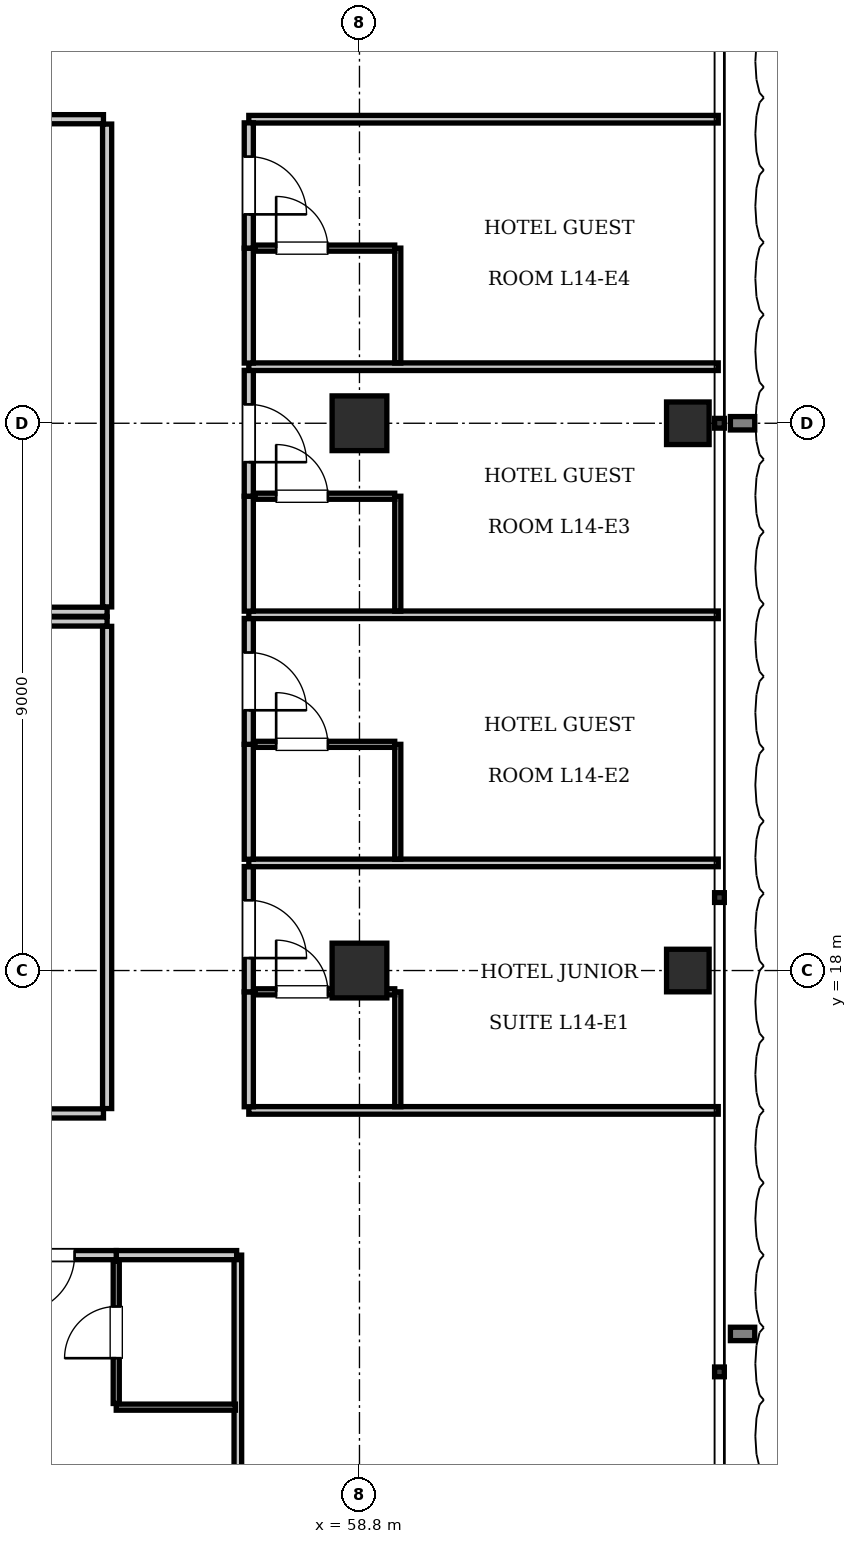
"""IFC4 building model, lengths in metres.
Left out: names, types, materials, properties, quantities, classifications, styles, units other than length and angle.
Written with IfcOpenShell. Run it as: python <this file> out.ifc"""

import sys

from ifc_helpers import new_model, si_unit, direction, frame, frame_2d, origin, origin_2d, place, context, subcontext, project, spatial, rectangle, i_section, extrude, element, fill, save


model = new_model("IFC4")
c1 = context("Model", 3, precision=1e-05, world=origin(), true_north=direction((0.0, 1.0)))
c2 = subcontext(c1, "Body", "Model", "MODEL_VIEW")
j1 = project(units=[si_unit("LENGTHUNIT", "METRE"), si_unit("PLANEANGLEUNIT", "RADIAN")], contexts=[c1])
p1 = place(None, origin())
s1 = spatial("IfcSite", under=j1, at=p1, CompositionType="ELEMENT")
p2 = place(p1, origin())
s2 = spatial("IfcBuilding", under=s1, at=p2, CompositionType="ELEMENT")
p3 = place(p2, frame((0.0, 0.0, 61.6)))
s3 = spatial("IfcBuildingStorey", under=s2, at=p3, CompositionType="ELEMENT", Elevation=61.6)
for number, where, z_axis, x_axis in (
    (1, (58.8, 18.0, 0.0), (0.0, 0.0, 1.0), (1.0, 0.0, 0.0)),
    (2, (58.8, 27.0, 0.0), (0.0, 0.0, 1.0), (1.0, 0.0, 0.0)),
):
    element("IfcColumn", number, at=place(p3, frame(where, z_axis=z_axis, x_axis=x_axis)), inside=s3, PredefinedType="COLUMN", context=c2, shape_type="SweptSolid", body=[
        extrude(rectangle(XDim=0.9, YDim=0.9, at=origin_2d()), origin(), (0.0, 0.0, 1.0), 3.85),
    ])
for number, where, z_axis, x_axis in (
    (3, (64.2, 18.0, 0.0), (0.0, 0.0, 1.0), (1.0, 0.0, 0.0)),
    (4, (64.2, 27.0, 0.0), (0.0, 0.0, 1.0), (1.0, 0.0, 0.0)),
):
    element("IfcColumn", number, at=place(p3, frame(where, z_axis=z_axis, x_axis=x_axis)), inside=s3, PredefinedType="COLUMN", context=c2, shape_type="SweptSolid", body=[
        extrude(i_section(OverallWidth=0.7, OverallDepth=0.7, WebThickness=0.028, FlangeThickness=0.044, at=origin_2d()), origin(), (0.0, 0.0, 1.0), 3.85),
    ])
p4 = place(p3, frame((20.95, 23.9, 0.0), z_axis=(0.0, 0.0, 1.0), x_axis=(1.0, 0.0, 0.0)))
e5 = element("IfcWall", 5, at=p4, inside=s3, PredefinedType="PARTITIONING", context=c2, shape_type="SweptSolid", body=[
    extrude(rectangle(XDim=33.7, YDim=0.15, at=frame_2d((16.85, 0.0))), origin(), (0.0, 0.0, 1.0), 3.61),
])
p5 = place(p3, frame((54.65, 23.98, 0.0), z_axis=(0.0, 0.0, 1.0), x_axis=(0.0, 1.0, 0.0)))
e6 = element("IfcWall", 6, at=p5, inside=s3, PredefinedType="PARTITIONING", context=c2, shape_type="SweptSolid", body=[
    extrude(rectangle(XDim=7.94, YDim=0.15, at=frame_2d((3.97, 0.0))), origin(), (0.0, 0.0, 1.0), 3.293),
])
p6 = place(p3, frame((43.222, 32.0, 0.0), z_axis=(0.0, 0.0, 1.0), x_axis=(1.0, 0.0, 0.0)))
e7 = element("IfcWall", 7, at=p6, inside=s3, PredefinedType="PARTITIONING", context=c2, shape_type="SweptSolid", body=[
    extrude(rectangle(XDim=11.368, YDim=0.15, at=frame_2d((5.684, 0.0))), origin(), (0.0, 0.0, 1.0), 3.61),
])
p7 = place(p6, frame((5.234, 0.0, 0.0)))
e8 = element("IfcOpeningElement", 8, at=p7, cuts=e7, PredefinedType="OPENING", context=c2, shape_type="SweptSolid", body=[
    extrude(rectangle(XDim=0.9, YDim=2.1, at=frame_2d((0.45, 1.05))), frame((0.0, 0.085, 0.0), z_axis=(0.0, -1.0, 0.0), x_axis=(1.0, 0.0, 0.0)), (0.0, 0.0, 1.0), 0.17),
])
p8 = place(p3, frame((20.95, 23.74, 0.0), z_axis=(0.0, 0.0, 1.0), x_axis=(1.0, 0.0, 0.0)))
e9 = element("IfcWall", 9, at=p8, inside=s3, PredefinedType="PARTITIONING", context=c2, shape_type="SweptSolid", body=[
    extrude(rectangle(XDim=33.7, YDim=0.15, at=frame_2d((16.85, 0.0))), origin(), (0.0, 0.0, 1.0), 3.61),
])
p9 = place(p3, frame((54.65, 15.73, 0.0), z_axis=(0.0, 0.0, 1.0), x_axis=(0.0, 1.0, 0.0)))
e10 = element("IfcWall", 10, at=p9, inside=s3, PredefinedType="PARTITIONING", context=c2, shape_type="SweptSolid", body=[
    extrude(rectangle(XDim=7.93, YDim=0.15, at=frame_2d((3.965, 0.0))), origin(), (0.0, 0.0, 1.0), 3.255),
])
p10 = place(p3, frame((40.189, 15.65, 0.0), z_axis=(0.0, 0.0, 1.0), x_axis=(1.0, 0.0, 0.0)))
e11 = element("IfcWall", 11, at=p10, inside=s3, PredefinedType="PARTITIONING", context=c2, shape_type="SweptSolid", body=[
    extrude(rectangle(XDim=14.401, YDim=0.15, at=frame_2d((7.201, 0.0))), origin(), (0.0, 0.0, 1.0), 3.61),
])
p11 = place(p10, frame((6.75, 0.0, 0.0)))
e12 = element("IfcOpeningElement", 12, at=p11, cuts=e11, PredefinedType="OPENING", context=c2, shape_type="SweptSolid", body=[
    extrude(rectangle(XDim=0.9, YDim=2.1, at=frame_2d((0.45, 1.05))), frame((0.0, 0.085, 0.0), z_axis=(0.0, -1.0, 0.0), x_axis=(1.0, 0.0, 0.0)), (0.0, 0.0, 1.0), 0.17),
])
p12 = place(p3, frame((56.8, 0.1, 0.0), z_axis=(0.0, 0.0, 1.0), x_axis=(0.0, 1.0, 0.0)))
e13 = element("IfcWall", 13, at=p12, inside=s3, PredefinedType="PARTITIONING", context=c2, shape_type="SweptSolid", body=[
    extrude(rectangle(XDim=13.22, YDim=0.125, at=frame_2d((6.61, 0.0))), origin(), (0.0, 0.0, 1.0), 3.61),
])
p13 = place(p3, frame((54.8, 13.32, 0.0), z_axis=(0.0, 0.0, 1.0), x_axis=(1.0, 0.0, 0.0)))
e14 = element("IfcWall", 14, at=p13, inside=s3, PredefinedType="PARTITIONING", context=c2, shape_type="SweptSolid", body=[
    extrude(rectangle(XDim=1.98, YDim=0.15, at=frame_2d((0.99, 0.0))), origin(), (0.0, 0.0, 1.0), 3.61),
])
p14 = place(p3, frame((54.8, 10.82, 0.0), z_axis=(0.0, 0.0, 1.0), x_axis=(1.0, 0.0, 0.0)))
e15 = element("IfcWall", 15, at=p14, inside=s3, PredefinedType="PARTITIONING", context=c2, shape_type="SweptSolid", body=[
    extrude(rectangle(XDim=1.96, YDim=0.1, at=frame_2d((0.98, 0.0))), origin(), (0.0, 0.0, 1.0), 3.61),
])
p15 = place(p3, frame((54.8, 10.88, 0.0), z_axis=(0.0, 0.0, 1.0), x_axis=(0.0, 1.0, 0.0)))
e16 = element("IfcWall", 16, at=p15, inside=s3, PredefinedType="PARTITIONING", context=c2, shape_type="SweptSolid", body=[
    extrude(rectangle(XDim=2.34, YDim=0.1, at=frame_2d((1.17, 0.0))), origin(), (0.0, 0.0, 1.0), 3.61),
])
p16 = place(p15, frame((0.745, 0.0, 0.0)))
e17 = element("IfcOpeningElement", 17, at=p16, cuts=e16, PredefinedType="OPENING", context=c2, shape_type="SweptSolid", body=[
    extrude(rectangle(XDim=0.85, YDim=2.1, at=frame_2d((0.425, 1.05))), frame((0.0, 0.06, 0.0), z_axis=(0.0, -1.0, 0.0), x_axis=(1.0, 0.0, 0.0)), (0.0, 0.0, 1.0), 0.12),
])
p17 = place(p3, frame((52.48, 13.32, 0.0), z_axis=(0.0, 0.0, 1.0), x_axis=(1.0, 0.0, 0.0)))
e18 = element("IfcWall", 18, at=p17, inside=s3, PredefinedType="PARTITIONING", context=c2, shape_type="SweptSolid", body=[
    extrude(rectangle(XDim=2.32, YDim=0.15, at=frame_2d((1.16, 0.0))), origin(), (0.0, 0.0, 1.0), 3.61),
])
p18 = place(p17, frame((0.685, 0.0, 0.0)))
e19 = element("IfcOpeningElement", 19, at=p18, cuts=e18, PredefinedType="OPENING", context=c2, shape_type="SweptSolid", body=[
    extrude(rectangle(XDim=0.95, YDim=2.15, at=frame_2d((0.475, 1.075))), frame((0.0, 0.085, 0.0), z_axis=(0.0, -1.0, 0.0), x_axis=(1.0, 0.0, 0.0)), (0.0, 0.0, 1.0), 0.17),
])
for number, where, z_axis, x_axis in (
    (20, (56.98, 15.7, 0.0), (0.0, 0.0, 1.0), (1.0, 0.0, 0.0)),
    (21, (56.98, 32.0, 0.0), (0.0, 0.0, 1.0), (1.0, 0.0, 0.0)),
):
    element("IfcWall", number, at=place(p3, frame(where, z_axis=z_axis, x_axis=x_axis)), inside=s3, PredefinedType="PARTITIONING", context=c2, shape_type="SweptSolid", body=[
        extrude(rectangle(XDim=7.72, YDim=0.125, at=frame_2d((3.86, 0.0))), origin(), (0.0, 0.0, 1.0), 3.61),
    ])
p19 = place(p3, frame((56.98, 15.76, 0.0), z_axis=(0.0, 0.0, 1.0), x_axis=(0.0, 1.0, 0.0)))
e22 = element("IfcWall", 22, at=p19, inside=s3, PredefinedType="PARTITIONING", context=c2, shape_type="SweptSolid", body=[
    extrude(rectangle(XDim=1.89, YDim=0.15, at=frame_2d((0.945, 0.0))), origin(), (0.0, 0.0, 1.0), 3.61),
])
p20 = place(p3, frame((56.98, 17.65, 0.0), z_axis=(0.0, 0.0, 1.0), x_axis=(0.0, 1.0, 0.0)))
e23 = element("IfcWall", 23, at=p20, inside=s3, PredefinedType="PARTITIONING", context=c2, shape_type="SweptSolid", body=[
    extrude(rectangle(XDim=2.06, YDim=0.15, at=frame_2d((1.03, 0.0))), origin(), (0.0, 0.0, 1.0), 3.61),
])
p21 = place(p20, frame((0.555, 0.0, 0.0)))
e24 = element("IfcOpeningElement", 24, at=p21, cuts=e23, PredefinedType="OPENING", context=c2, shape_type="SweptSolid", body=[
    extrude(rectangle(XDim=0.95, YDim=2.15, at=frame_2d((0.475, 1.075))), frame((0.0, 0.085, 0.0), z_axis=(0.0, -1.0, 0.0), x_axis=(1.0, 0.0, 0.0)), (0.0, 0.0, 1.0), 0.17),
])
p22 = place(p3, frame((59.43, 15.76, 0.0), z_axis=(0.0, 0.0, 1.0), x_axis=(0.0, 1.0, 0.0)))
e25 = element("IfcWall", 25, at=p22, inside=s3, PredefinedType="PARTITIONING", context=c2, shape_type="SweptSolid", body=[
    extrude(rectangle(XDim=1.89, YDim=0.1, at=frame_2d((0.945, 0.0))), origin(), (0.0, 0.0, 1.0), 3.61),
])
p23 = place(p3, frame((57.08, 17.65, 0.0), z_axis=(0.0, 0.0, 1.0), x_axis=(1.0, 0.0, 0.0)))
e26 = element("IfcWall", 26, at=p23, inside=s3, PredefinedType="PARTITIONING", context=c2, shape_type="SweptSolid", body=[
    extrude(rectangle(XDim=2.3, YDim=0.1, at=frame_2d((1.15, 0.0))), origin(), (0.0, 0.0, 1.0), 3.61),
])
p24 = place(p23, frame((0.35, 0.0, 0.0)))
e27 = element("IfcOpeningElement", 27, at=p24, cuts=e26, PredefinedType="OPENING", context=c2, shape_type="SweptSolid", body=[
    extrude(rectangle(XDim=0.85, YDim=2.1, at=frame_2d((0.425, 1.05))), frame((0.0, 0.06, 0.0), z_axis=(0.0, -1.0, 0.0), x_axis=(1.0, 0.0, 0.0)), (0.0, 0.0, 1.0), 0.12),
])
p25 = place(p3, frame((56.98, 19.77, 0.0), z_axis=(0.0, 0.0, 1.0), x_axis=(1.0, 0.0, 0.0)))
e28 = element("IfcWall", 28, at=p25, inside=s3, PredefinedType="PARTITIONING", context=c2, shape_type="SweptSolid", body=[
    extrude(rectangle(XDim=7.72, YDim=0.125, at=frame_2d((3.86, 0.0))), origin(), (0.0, 0.0, 1.0), 3.61),
])
p26 = place(p3, frame((56.98, 19.83, 0.0), z_axis=(0.0, 0.0, 1.0), x_axis=(0.0, 1.0, 0.0)))
e29 = element("IfcWall", 29, at=p26, inside=s3, PredefinedType="PARTITIONING", context=c2, shape_type="SweptSolid", body=[
    extrude(rectangle(XDim=1.89, YDim=0.15, at=frame_2d((0.945, 0.0))), origin(), (0.0, 0.0, 1.0), 3.61),
])
p27 = place(p3, frame((56.98, 21.72, 0.0), z_axis=(0.0, 0.0, 1.0), x_axis=(0.0, 1.0, 0.0)))
e30 = element("IfcWall", 30, at=p27, inside=s3, PredefinedType="PARTITIONING", context=c2, shape_type="SweptSolid", body=[
    extrude(rectangle(XDim=2.07, YDim=0.15, at=frame_2d((1.035, 0.0))), origin(), (0.0, 0.0, 1.0), 3.61),
])
p28 = place(p27, frame((0.56, 0.0, 0.0)))
e31 = element("IfcOpeningElement", 31, at=p28, cuts=e30, PredefinedType="OPENING", context=c2, shape_type="SweptSolid", body=[
    extrude(rectangle(XDim=0.95, YDim=2.15, at=frame_2d((0.475, 1.075))), frame((0.0, 0.085, 0.0), z_axis=(0.0, -1.0, 0.0), x_axis=(1.0, 0.0, 0.0)), (0.0, 0.0, 1.0), 0.17),
])
p29 = place(p3, frame((59.43, 19.83, 0.0), z_axis=(0.0, 0.0, 1.0), x_axis=(0.0, 1.0, 0.0)))
e32 = element("IfcWall", 32, at=p29, inside=s3, PredefinedType="PARTITIONING", context=c2, shape_type="SweptSolid", body=[
    extrude(rectangle(XDim=1.89, YDim=0.1, at=frame_2d((0.945, 0.0))), origin(), (0.0, 0.0, 1.0), 3.61),
])
p30 = place(p3, frame((57.08, 21.72, 0.0), z_axis=(0.0, 0.0, 1.0), x_axis=(1.0, 0.0, 0.0)))
e33 = element("IfcWall", 33, at=p30, inside=s3, PredefinedType="PARTITIONING", context=c2, shape_type="SweptSolid", body=[
    extrude(rectangle(XDim=2.3, YDim=0.1, at=frame_2d((1.15, 0.0))), origin(), (0.0, 0.0, 1.0), 3.61),
])
p31 = place(p30, frame((0.35, 0.0, 0.0)))
e34 = element("IfcOpeningElement", 34, at=p31, cuts=e33, PredefinedType="OPENING", context=c2, shape_type="SweptSolid", body=[
    extrude(rectangle(XDim=0.85, YDim=2.1, at=frame_2d((0.425, 1.05))), frame((0.0, 0.06, 0.0), z_axis=(0.0, -1.0, 0.0), x_axis=(1.0, 0.0, 0.0)), (0.0, 0.0, 1.0), 0.12),
])
p32 = place(p3, frame((56.98, 23.85, 0.0), z_axis=(0.0, 0.0, 1.0), x_axis=(1.0, 0.0, 0.0)))
e35 = element("IfcWall", 35, at=p32, inside=s3, PredefinedType="PARTITIONING", context=c2, shape_type="SweptSolid", body=[
    extrude(rectangle(XDim=7.72, YDim=0.125, at=frame_2d((3.86, 0.0))), origin(), (0.0, 0.0, 1.0), 3.61),
])
p33 = place(p3, frame((56.98, 23.91, 0.0), z_axis=(0.0, 0.0, 1.0), x_axis=(0.0, 1.0, 0.0)))
e36 = element("IfcWall", 36, at=p33, inside=s3, PredefinedType="PARTITIONING", context=c2, shape_type="SweptSolid", body=[
    extrude(rectangle(XDim=1.89, YDim=0.15, at=frame_2d((0.945, 0.0))), origin(), (0.0, 0.0, 1.0), 3.61),
])
p34 = place(p3, frame((56.98, 25.8, 0.0), z_axis=(0.0, 0.0, 1.0), x_axis=(0.0, 1.0, 0.0)))
e37 = element("IfcWall", 37, at=p34, inside=s3, PredefinedType="PARTITIONING", context=c2, shape_type="SweptSolid", body=[
    extrude(rectangle(XDim=2.07, YDim=0.15, at=frame_2d((1.035, 0.0))), origin(), (0.0, 0.0, 1.0), 3.61),
])
p35 = place(p34, frame((0.56, 0.0, 0.0)))
e38 = element("IfcOpeningElement", 38, at=p35, cuts=e37, PredefinedType="OPENING", context=c2, shape_type="SweptSolid", body=[
    extrude(rectangle(XDim=0.95, YDim=2.15, at=frame_2d((0.475, 1.075))), frame((0.0, 0.085, 0.0), z_axis=(0.0, -1.0, 0.0), x_axis=(1.0, 0.0, 0.0)), (0.0, 0.0, 1.0), 0.17),
])
p36 = place(p3, frame((59.43, 23.91, 0.0), z_axis=(0.0, 0.0, 1.0), x_axis=(0.0, 1.0, 0.0)))
e39 = element("IfcWall", 39, at=p36, inside=s3, PredefinedType="PARTITIONING", context=c2, shape_type="SweptSolid", body=[
    extrude(rectangle(XDim=1.89, YDim=0.1, at=frame_2d((0.945, 0.0))), origin(), (0.0, 0.0, 1.0), 3.61),
])
p37 = place(p3, frame((57.08, 25.8, 0.0), z_axis=(0.0, 0.0, 1.0), x_axis=(1.0, 0.0, 0.0)))
e40 = element("IfcWall", 40, at=p37, inside=s3, PredefinedType="PARTITIONING", context=c2, shape_type="SweptSolid", body=[
    extrude(rectangle(XDim=2.3, YDim=0.1, at=frame_2d((1.15, 0.0))), origin(), (0.0, 0.0, 1.0), 3.61),
])
p38 = place(p37, frame((0.35, 0.0, 0.0)))
e41 = element("IfcOpeningElement", 41, at=p38, cuts=e40, PredefinedType="OPENING", context=c2, shape_type="SweptSolid", body=[
    extrude(rectangle(XDim=0.85, YDim=2.1, at=frame_2d((0.425, 1.05))), frame((0.0, 0.06, 0.0), z_axis=(0.0, -1.0, 0.0), x_axis=(1.0, 0.0, 0.0)), (0.0, 0.0, 1.0), 0.12),
])
p39 = place(p3, frame((56.98, 27.93, 0.0), z_axis=(0.0, 0.0, 1.0), x_axis=(1.0, 0.0, 0.0)))
e42 = element("IfcWall", 42, at=p39, inside=s3, PredefinedType="PARTITIONING", context=c2, shape_type="SweptSolid", body=[
    extrude(rectangle(XDim=7.72, YDim=0.125, at=frame_2d((3.86, 0.0))), origin(), (0.0, 0.0, 1.0), 3.61),
])
p40 = place(p3, frame((56.98, 27.99, 0.0), z_axis=(0.0, 0.0, 1.0), x_axis=(0.0, 1.0, 0.0)))
e43 = element("IfcWall", 43, at=p40, inside=s3, PredefinedType="PARTITIONING", context=c2, shape_type="SweptSolid", body=[
    extrude(rectangle(XDim=1.89, YDim=0.15, at=frame_2d((0.945, 0.0))), origin(), (0.0, 0.0, 1.0), 3.61),
])
p41 = place(p3, frame((56.98, 29.88, 0.0), z_axis=(0.0, 0.0, 1.0), x_axis=(0.0, 1.0, 0.0)))
e44 = element("IfcWall", 44, at=p41, inside=s3, PredefinedType="PARTITIONING", context=c2, shape_type="SweptSolid", body=[
    extrude(rectangle(XDim=2.06, YDim=0.15, at=frame_2d((1.03, 0.0))), origin(), (0.0, 0.0, 1.0), 3.61),
])
p42 = place(p41, frame((0.555, 0.0, 0.0)))
e45 = element("IfcOpeningElement", 45, at=p42, cuts=e44, PredefinedType="OPENING", context=c2, shape_type="SweptSolid", body=[
    extrude(rectangle(XDim=0.95, YDim=2.15, at=frame_2d((0.475, 1.075))), frame((0.0, 0.085, 0.0), z_axis=(0.0, -1.0, 0.0), x_axis=(1.0, 0.0, 0.0)), (0.0, 0.0, 1.0), 0.17),
])
p43 = place(p3, frame((59.43, 27.99, 0.0), z_axis=(0.0, 0.0, 1.0), x_axis=(0.0, 1.0, 0.0)))
e46 = element("IfcWall", 46, at=p43, inside=s3, PredefinedType="PARTITIONING", context=c2, shape_type="SweptSolid", body=[
    extrude(rectangle(XDim=1.89, YDim=0.1, at=frame_2d((0.945, 0.0))), origin(), (0.0, 0.0, 1.0), 3.61),
])
p44 = place(p3, frame((57.08, 29.88, 0.0), z_axis=(0.0, 0.0, 1.0), x_axis=(1.0, 0.0, 0.0)))
e47 = element("IfcWall", 47, at=p44, inside=s3, PredefinedType="PARTITIONING", context=c2, shape_type="SweptSolid", body=[
    extrude(rectangle(XDim=2.3, YDim=0.1, at=frame_2d((1.15, 0.0))), origin(), (0.0, 0.0, 1.0), 3.61),
])
p45 = place(p44, frame((0.35, 0.0, 0.0)))
e48 = element("IfcOpeningElement", 48, at=p45, cuts=e47, PredefinedType="OPENING", context=c2, shape_type="SweptSolid", body=[
    extrude(rectangle(XDim=0.85, YDim=2.1, at=frame_2d((0.425, 1.05))), frame((0.0, 0.06, 0.0), z_axis=(0.0, -1.0, 0.0), x_axis=(1.0, 0.0, 0.0)), (0.0, 0.0, 1.0), 0.12),
])
p46 = place(p16, origin())
e49 = element("IfcDoor", 49, at=p46, inside=s3, OperationType="SINGLE_SWING_LEFT", PredefinedType="DOOR", context=c2, shape_type="SweptSolid", body=[
    extrude(rectangle(XDim=0.85, YDim=2.1, at=frame_2d((0.425, 1.05))), frame((0.0, 0.025, 0.0), z_axis=(0.0, -1.0, 0.0), x_axis=(1.0, 0.0, 0.0)), (0.0, 0.0, 1.0), 0.05),
])
fill(e17, e49)
p47 = place(p18, frame((0.95, 0.0, 0.0), z_axis=(0.0, 0.0, 1.0), x_axis=(-1.0, 0.0, 0.0)))
e50 = element("IfcDoor", 50, at=p47, inside=s3, OperationType="SINGLE_SWING_RIGHT", PredefinedType="DOOR", context=c2, shape_type="SweptSolid", body=[
    extrude(rectangle(XDim=0.95, YDim=2.15, at=frame_2d((0.475, 1.075))), frame((0.0, 0.025, 0.0), z_axis=(0.0, -1.0, 0.0), x_axis=(1.0, 0.0, 0.0)), (0.0, 0.0, 1.0), 0.05),
])
fill(e19, e50)
p48 = place(p24, origin())
e51 = element("IfcDoor", 51, at=p48, inside=s3, OperationType="SINGLE_SWING_LEFT", PredefinedType="DOOR", context=c2, shape_type="SweptSolid", body=[
    extrude(rectangle(XDim=0.85, YDim=2.1, at=frame_2d((0.425, 1.05))), frame((0.0, 0.025, 0.0), z_axis=(0.0, -1.0, 0.0), x_axis=(1.0, 0.0, 0.0)), (0.0, 0.0, 1.0), 0.05),
])
fill(e27, e51)
p49 = place(p21, frame((0.95, 0.0, 0.0), z_axis=(0.0, 0.0, 1.0), x_axis=(-1.0, 0.0, 0.0)))
e52 = element("IfcDoor", 52, at=p49, inside=s3, OperationType="SINGLE_SWING_RIGHT", PredefinedType="DOOR", context=c2, shape_type="SweptSolid", body=[
    extrude(rectangle(XDim=0.95, YDim=2.15, at=frame_2d((0.475, 1.075))), frame((0.0, 0.025, 0.0), z_axis=(0.0, -1.0, 0.0), x_axis=(1.0, 0.0, 0.0)), (0.0, 0.0, 1.0), 0.05),
])
fill(e24, e52)
p50 = place(p31, origin())
e53 = element("IfcDoor", 53, at=p50, inside=s3, OperationType="SINGLE_SWING_LEFT", PredefinedType="DOOR", context=c2, shape_type="SweptSolid", body=[
    extrude(rectangle(XDim=0.85, YDim=2.1, at=frame_2d((0.425, 1.05))), frame((0.0, 0.025, 0.0), z_axis=(0.0, -1.0, 0.0), x_axis=(1.0, 0.0, 0.0)), (0.0, 0.0, 1.0), 0.05),
])
fill(e34, e53)
p51 = place(p28, frame((0.95, 0.0, 0.0), z_axis=(0.0, 0.0, 1.0), x_axis=(-1.0, 0.0, 0.0)))
e54 = element("IfcDoor", 54, at=p51, inside=s3, OperationType="SINGLE_SWING_RIGHT", PredefinedType="DOOR", context=c2, shape_type="SweptSolid", body=[
    extrude(rectangle(XDim=0.95, YDim=2.15, at=frame_2d((0.475, 1.075))), frame((0.0, 0.025, 0.0), z_axis=(0.0, -1.0, 0.0), x_axis=(1.0, 0.0, 0.0)), (0.0, 0.0, 1.0), 0.05),
])
fill(e31, e54)
p52 = place(p38, origin())
e55 = element("IfcDoor", 55, at=p52, inside=s3, OperationType="SINGLE_SWING_LEFT", PredefinedType="DOOR", context=c2, shape_type="SweptSolid", body=[
    extrude(rectangle(XDim=0.85, YDim=2.1, at=frame_2d((0.425, 1.05))), frame((0.0, 0.025, 0.0), z_axis=(0.0, -1.0, 0.0), x_axis=(1.0, 0.0, 0.0)), (0.0, 0.0, 1.0), 0.05),
])
fill(e41, e55)
p53 = place(p35, frame((0.95, 0.0, 0.0), z_axis=(0.0, 0.0, 1.0), x_axis=(-1.0, 0.0, 0.0)))
e56 = element("IfcDoor", 56, at=p53, inside=s3, OperationType="SINGLE_SWING_RIGHT", PredefinedType="DOOR", context=c2, shape_type="SweptSolid", body=[
    extrude(rectangle(XDim=0.95, YDim=2.15, at=frame_2d((0.475, 1.075))), frame((0.0, 0.025, 0.0), z_axis=(0.0, -1.0, 0.0), x_axis=(1.0, 0.0, 0.0)), (0.0, 0.0, 1.0), 0.05),
])
fill(e38, e56)
p54 = place(p45, origin())
e57 = element("IfcDoor", 57, at=p54, inside=s3, OperationType="SINGLE_SWING_LEFT", PredefinedType="DOOR", context=c2, shape_type="SweptSolid", body=[
    extrude(rectangle(XDim=0.85, YDim=2.1, at=frame_2d((0.425, 1.05))), frame((0.0, 0.025, 0.0), z_axis=(0.0, -1.0, 0.0), x_axis=(1.0, 0.0, 0.0)), (0.0, 0.0, 1.0), 0.05),
])
fill(e48, e57)
p55 = place(p42, frame((0.95, 0.0, 0.0), z_axis=(0.0, 0.0, 1.0), x_axis=(-1.0, 0.0, 0.0)))
e58 = element("IfcDoor", 58, at=p55, inside=s3, OperationType="SINGLE_SWING_RIGHT", PredefinedType="DOOR", context=c2, shape_type="SweptSolid", body=[
    extrude(rectangle(XDim=0.95, YDim=2.15, at=frame_2d((0.475, 1.075))), frame((0.0, 0.025, 0.0), z_axis=(0.0, -1.0, 0.0), x_axis=(1.0, 0.0, 0.0)), (0.0, 0.0, 1.0), 0.05),
])
fill(e45, e58)
save(model, sys.argv[1])
